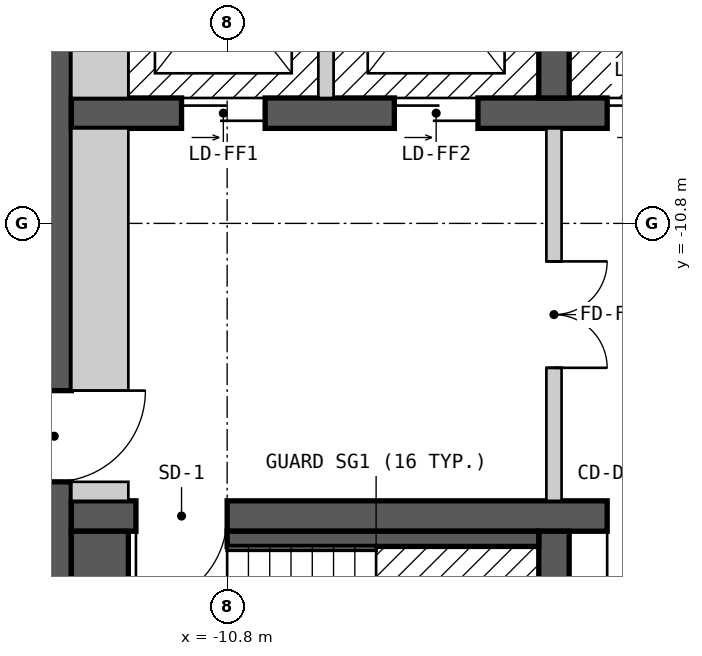
"""IFC4 building model, lengths in metres.
Left out: names, types, materials, properties, quantities, classifications, styles, units other than length and angle.
Written with IfcOpenShell. Run it as: python <this file> out.ifc"""

import sys

from ifc_helpers import new_model, si_unit, direction, frame, frame_2d, origin, place, context, subcontext, project, spatial, rectangle, extrude, element, fill, save


model = new_model("IFC4")
c1 = context("Model", 3, precision=1e-05, world=origin(), true_north=direction((0.0, 1.0)))
c2 = subcontext(c1, "Body", "Model", "MODEL_VIEW")
j1 = project(units=[si_unit("LENGTHUNIT", "METRE"), si_unit("PLANEANGLEUNIT", "RADIAN")], contexts=[c1])
p1 = place(None, origin())
s1 = spatial("IfcSite", under=j1, at=p1, CompositionType="ELEMENT")
p2 = place(p1, origin())
s2 = spatial("IfcBuilding", under=s1, at=p2, CompositionType="ELEMENT")
p3 = place(p2, frame((0.0, 0.0, 205.8)))
s3 = spatial("IfcBuildingStorey", under=s2, at=p3, CompositionType="ELEMENT", Elevation=205.8)
p4 = place(p3, frame((-13.075, -18.55, 0.0), z_axis=(0.0, 0.0, 1.0), x_axis=(0.0, 1.0, 0.0)))
e1 = element("IfcWall", 1, at=p4, inside=s3, PredefinedType="SHEAR", context=c2, shape_type="SweptSolid", body=[
    extrude(rectangle(XDim=13.1, YDim=0.45, at=frame_2d((6.55, 0.0))), origin(), (0.0, 0.0, 1.0), 2.7),
])
p5 = place(p4, frame((4.35, 0.0, 0.0)))
e2 = element("IfcOpeningElement", 2, at=p5, cuts=e1, PredefinedType="OPENING", context=c2, shape_type="SweptSolid", body=[
    extrude(rectangle(XDim=1.2, YDim=2.1, at=frame_2d((0.6, 1.05))), frame((0.0, 0.235, 0.0), z_axis=(0.0, -1.0, 0.0), x_axis=(1.0, 0.0, 0.0)), (0.0, 0.0, 1.0), 0.47),
])
p6 = place(p3, frame((-12.85, -14.65, 0.0), z_axis=(0.0, 0.0, 1.0), x_axis=(1.0, 0.0, 0.0)))
e3 = element("IfcWall", 3, at=p6, inside=s3, PredefinedType="SHEAR", context=c2, shape_type="SweptSolid", body=[
    extrude(rectangle(XDim=25.7, YDim=0.4, at=frame_2d((12.85, 0.0))), origin(), (0.0, 0.0, 1.0), 2.7),
])
p7 = place(p6, frame((2.05, 0.0, 0.0), z_axis=(0.0, 0.0, 1.0), x_axis=(-1.0, 0.0, 0.0)))
e4 = element("IfcOpeningElement", 4, at=p7, cuts=e3, PredefinedType="OPENING", context=c2, shape_type="SweptSolid", body=[
    extrude(rectangle(XDim=1.2, YDim=2.1, at=frame_2d((0.6, 1.05))), frame((0.0, 0.21, 0.0), z_axis=(0.0, -1.0, 0.0), x_axis=(1.0, 0.0, 0.0)), (0.0, 0.0, 1.0), 0.42),
])
p8 = place(p6, frame((24.9, 0.0, 0.0), z_axis=(0.0, 0.0, 1.0), x_axis=(-1.0, 0.0, 0.0)))
e5 = element("IfcOpeningElement", 5, at=p8, cuts=e3, PredefinedType="OPENING", context=c2, shape_type="SweptSolid", body=[
    extrude(rectangle(XDim=1.2, YDim=2.1, at=frame_2d((0.6, 1.05))), frame((0.0, 0.21, 0.0), z_axis=(0.0, -1.0, 0.0), x_axis=(1.0, 0.0, 0.0)), (0.0, 0.0, 1.0), 0.42),
])
p9 = place(p6, frame((7.95, 0.0, 0.0), z_axis=(0.0, 0.0, 1.0), x_axis=(-1.0, 0.0, 0.0)))
e6 = element("IfcOpeningElement", 6, at=p9, cuts=e3, PredefinedType="OPENING", context=c2, shape_type="SweptSolid", body=[
    extrude(rectangle(XDim=0.9, YDim=2.1, at=frame_2d((0.45, 1.05))), frame((0.0, 0.21, 0.0), z_axis=(0.0, -1.0, 0.0), x_axis=(1.0, 0.0, 0.0)), (0.0, 0.0, 1.0), 0.42),
])
p10 = place(p6, frame((10.0, 0.0, 0.0), z_axis=(0.0, 0.0, 1.0), x_axis=(-1.0, 0.0, 0.0)))
e7 = element("IfcOpeningElement", 7, at=p10, cuts=e3, PredefinedType="OPENING", context=c2, shape_type="SweptSolid", body=[
    extrude(rectangle(XDim=0.9, YDim=2.1, at=frame_2d((0.45, 1.05))), frame((0.0, 0.21, 0.0), z_axis=(0.0, -1.0, 0.0), x_axis=(1.0, 0.0, 0.0)), (0.0, 0.0, 1.0), 0.42),
])
p11 = place(p6, frame((12.3, 0.0, 0.0), z_axis=(0.0, 0.0, 1.0), x_axis=(-1.0, 0.0, 0.0)))
e8 = element("IfcOpeningElement", 8, at=p11, cuts=e3, PredefinedType="OPENING", context=c2, shape_type="SweptSolid", body=[
    extrude(rectangle(XDim=1.0, YDim=2.1, at=frame_2d((0.5, 1.05))), frame((0.0, 0.21, 0.0), z_axis=(0.0, -1.0, 0.0), x_axis=(1.0, 0.0, 0.0)), (0.0, 0.0, 1.0), 0.42),
])
p12 = place(p6, frame((14.5, 0.0, 0.0), z_axis=(0.0, 0.0, 1.0), x_axis=(-1.0, 0.0, 0.0)))
e9 = element("IfcOpeningElement", 9, at=p12, cuts=e3, PredefinedType="OPENING", context=c2, shape_type="SweptSolid", body=[
    extrude(rectangle(XDim=0.9, YDim=2.1, at=frame_2d((0.45, 1.05))), frame((0.0, 0.21, 0.0), z_axis=(0.0, -1.0, 0.0), x_axis=(1.0, 0.0, 0.0)), (0.0, 0.0, 1.0), 0.42),
])
p13 = place(p6, frame((16.5, 0.0, 0.0), z_axis=(0.0, 0.0, 1.0), x_axis=(-1.0, 0.0, 0.0)))
e10 = element("IfcOpeningElement", 10, at=p13, cuts=e3, PredefinedType="OPENING", context=c2, shape_type="SweptSolid", body=[
    extrude(rectangle(XDim=0.9, YDim=2.1, at=frame_2d((0.45, 1.05))), frame((0.0, 0.21, 0.0), z_axis=(0.0, -1.0, 0.0), x_axis=(1.0, 0.0, 0.0)), (0.0, 0.0, 1.0), 0.42),
])
p14 = place(p6, frame((18.65, 0.0, 0.0), z_axis=(0.0, 0.0, 1.0), x_axis=(-1.0, 0.0, 0.0)))
e11 = element("IfcOpeningElement", 11, at=p14, cuts=e3, PredefinedType="OPENING", context=c2, shape_type="SweptSolid", body=[
    extrude(rectangle(XDim=1.0, YDim=2.1, at=frame_2d((0.5, 1.05))), frame((0.0, 0.21, 0.0), z_axis=(0.0, -1.0, 0.0), x_axis=(1.0, 0.0, 0.0)), (0.0, 0.0, 1.0), 0.42),
])
p15 = place(p3, frame((-12.85, -9.35, 0.0), z_axis=(0.0, 0.0, 1.0), x_axis=(1.0, 0.0, 0.0)))
e12 = element("IfcWall", 12, at=p15, inside=s3, PredefinedType="SHEAR", context=c2, shape_type="SweptSolid", body=[
    extrude(rectangle(XDim=23.05, YDim=0.4, at=frame_2d((11.525, 0.0))), origin(), (0.0, 0.0, 1.0), 2.7),
])
p16 = place(p15, frame((1.45, 0.0, 0.0)))
e13 = element("IfcOpeningElement", 13, at=p16, cuts=e12, PredefinedType="OPENING", context=c2, shape_type="SweptSolid", body=[
    extrude(rectangle(XDim=1.1, YDim=2.1, at=frame_2d((0.55, 1.05))), frame((0.0, 0.21, 0.0), z_axis=(0.0, -1.0, 0.0), x_axis=(1.0, 0.0, 0.0)), (0.0, 0.0, 1.0), 0.42),
])
p17 = place(p15, frame((4.25, 0.0, 0.0)))
e14 = element("IfcOpeningElement", 14, at=p17, cuts=e12, PredefinedType="OPENING", context=c2, shape_type="SweptSolid", body=[
    extrude(rectangle(XDim=1.1, YDim=2.1, at=frame_2d((0.55, 1.05))), frame((0.0, 0.21, 0.0), z_axis=(0.0, -1.0, 0.0), x_axis=(1.0, 0.0, 0.0)), (0.0, 0.0, 1.0), 0.42),
])
p18 = place(p15, frame((7.05, 0.0, 0.0)))
e15 = element("IfcOpeningElement", 15, at=p18, cuts=e12, PredefinedType="OPENING", context=c2, shape_type="SweptSolid", body=[
    extrude(rectangle(XDim=1.1, YDim=2.1, at=frame_2d((0.55, 1.05))), frame((0.0, 0.21, 0.0), z_axis=(0.0, -1.0, 0.0), x_axis=(1.0, 0.0, 0.0)), (0.0, 0.0, 1.0), 0.42),
])
p19 = place(p15, frame((9.35, 0.0, 0.0)))
e16 = element("IfcOpeningElement", 16, at=p19, cuts=e12, PredefinedType="OPENING", context=c2, shape_type="SweptSolid", body=[
    extrude(rectangle(XDim=1.1, YDim=2.1, at=frame_2d((0.55, 1.05))), frame((0.0, 0.21, 0.0), z_axis=(0.0, -1.0, 0.0), x_axis=(1.0, 0.0, 0.0)), (0.0, 0.0, 1.0), 0.42),
])
p20 = place(p15, frame((11.65, 0.0, 0.0)))
e17 = element("IfcOpeningElement", 17, at=p20, cuts=e12, PredefinedType="OPENING", context=c2, shape_type="SweptSolid", body=[
    extrude(rectangle(XDim=1.1, YDim=2.1, at=frame_2d((0.55, 1.05))), frame((0.0, 0.21, 0.0), z_axis=(0.0, -1.0, 0.0), x_axis=(1.0, 0.0, 0.0)), (0.0, 0.0, 1.0), 0.42),
])
p21 = place(p15, frame((13.95, 0.0, 0.0)))
e18 = element("IfcOpeningElement", 18, at=p21, cuts=e12, PredefinedType="OPENING", context=c2, shape_type="SweptSolid", body=[
    extrude(rectangle(XDim=1.1, YDim=2.1, at=frame_2d((0.55, 1.05))), frame((0.0, 0.21, 0.0), z_axis=(0.0, -1.0, 0.0), x_axis=(1.0, 0.0, 0.0)), (0.0, 0.0, 1.0), 0.42),
])
p22 = place(p15, frame((16.25, 0.0, 0.0)))
e19 = element("IfcOpeningElement", 19, at=p22, cuts=e12, PredefinedType="OPENING", context=c2, shape_type="SweptSolid", body=[
    extrude(rectangle(XDim=1.1, YDim=2.1, at=frame_2d((0.55, 1.05))), frame((0.0, 0.21, 0.0), z_axis=(0.0, -1.0, 0.0), x_axis=(1.0, 0.0, 0.0)), (0.0, 0.0, 1.0), 0.42),
])
p23 = place(p15, frame((18.55, 0.0, 0.0)))
e20 = element("IfcOpeningElement", 20, at=p23, cuts=e12, PredefinedType="OPENING", context=c2, shape_type="SweptSolid", body=[
    extrude(rectangle(XDim=1.1, YDim=2.1, at=frame_2d((0.55, 1.05))), frame((0.0, 0.21, 0.0), z_axis=(0.0, -1.0, 0.0), x_axis=(1.0, 0.0, 0.0)), (0.0, 0.0, 1.0), 0.42),
])
p24 = place(p15, frame((20.95, 0.0, 0.0)))
e21 = element("IfcOpeningElement", 21, at=p24, cuts=e12, PredefinedType="OPENING", context=c2, shape_type="SweptSolid", body=[
    extrude(rectangle(XDim=1.1, YDim=2.1, at=frame_2d((0.55, 1.05))), frame((0.0, 0.21, 0.0), z_axis=(0.0, -1.0, 0.0), x_axis=(1.0, 0.0, 0.0)), (0.0, 0.0, 1.0), 0.42),
])
for number, where, z_axis, x_axis in (
    (22, (-6.5, -18.55, 0.0), (0.0, 0.0, 1.0), (0.0, 1.0, 0.0)),
    (23, (-6.5, -9.15, 0.0), (0.0, 0.0, 1.0), (0.0, 1.0, 0.0)),
):
    element("IfcWall", number, at=place(p3, frame(where, z_axis=z_axis, x_axis=x_axis)), inside=s3, PredefinedType="SHEAR", context=c2, shape_type="SweptSolid", body=[
        extrude(rectangle(XDim=3.7, YDim=0.4, at=frame_2d((1.85, 0.0))), origin(), (0.0, 0.0, 1.0), 2.7),
    ])
p25 = place(p3, frame((-12.475, -18.55, 0.0), z_axis=(0.0, 0.0, 1.0), x_axis=(0.0, 1.0, 0.0)))
e24 = element("IfcWall", 24, at=p25, inside=s3, PredefinedType="SOLIDWALL", context=c2, shape_type="SweptSolid", body=[
    extrude(rectangle(XDim=3.7, YDim=0.75, at=frame_2d((1.85, 0.0))), origin(), (0.0, 0.0, 1.0), 2.7),
])
p26 = place(p3, frame((-12.85, -14.325, 0.0), z_axis=(0.0, 0.0, 1.0), x_axis=(1.0, 0.0, 0.0)))
e25 = element("IfcWall", 25, at=p26, inside=s3, PredefinedType="PARTITIONING", context=c2, shape_type="SweptSolid", body=[
    extrude(rectangle(XDim=0.75, YDim=0.25, at=frame_2d((0.375, 0.0))), origin(), (0.0, 0.0, 1.0), 2.7),
])
p27 = place(p3, frame((-12.475, -13.0, 0.0), z_axis=(0.0, 0.0, 1.0), x_axis=(0.0, 1.0, 0.0)))
e26 = element("IfcWall", 26, at=p27, inside=s3, PredefinedType="PARTITIONING", context=c2, shape_type="SweptSolid", body=[
    extrude(rectangle(XDim=3.45, YDim=0.75, at=frame_2d((1.725, 0.0))), origin(), (0.0, 0.0, 1.0), 2.7),
])
p28 = place(p3, frame((-12.475, -9.15, 0.0), z_axis=(0.0, 0.0, 1.0), x_axis=(0.0, 1.0, 0.0)))
e27 = element("IfcWall", 27, at=p28, inside=s3, PredefinedType="SOLIDWALL", context=c2, shape_type="SweptSolid", body=[
    extrude(rectangle(XDim=3.7, YDim=0.75, at=frame_2d((1.85, 0.0))), origin(), (0.0, 0.0, 1.0), 2.7),
])
p29 = place(p3, frame((-10.8, -14.95, 0.0), z_axis=(0.0, 0.0, 1.0), x_axis=(1.0, 0.0, 0.0)))
e28 = element("IfcWall", 28, at=p29, inside=s3, PredefinedType="SOLIDWALL", context=c2, shape_type="SweptSolid", body=[
    extrude(rectangle(XDim=4.1, YDim=0.2, at=frame_2d((2.05, 0.0))), origin(), (0.0, 0.0, 1.0), 2.7),
])
p30 = place(p3, frame((-9.5, -9.15, 0.0), z_axis=(0.0, 0.0, 1.0), x_axis=(0.0, 1.0, 0.0)))
e29 = element("IfcWall", 29, at=p30, inside=s3, PredefinedType="SOLIDWALL", context=c2, shape_type="SweptSolid", body=[
    extrude(rectangle(XDim=2.95, YDim=0.2, at=frame_2d((1.475, 0.0))), origin(), (0.0, 0.0, 1.0), 2.7),
])
p31 = place(p3, frame((-6.5, -14.45, 0.0), z_axis=(0.0, 0.0, 1.0), x_axis=(0.0, 1.0, 0.0)))
e30 = element("IfcWall", 30, at=p31, inside=s3, PredefinedType="PARTITIONING", context=c2, shape_type="SweptSolid", body=[
    extrude(rectangle(XDim=4.9, YDim=0.2, at=frame_2d((2.45, 0.0))), origin(), (0.0, 0.0, 1.0), 2.7),
])
p32 = place(p31, frame((3.15, 0.0, 0.0), z_axis=(0.0, 0.0, 1.0), x_axis=(-1.0, 0.0, 0.0)))
e31 = element("IfcOpeningElement", 31, at=p32, cuts=e30, PredefinedType="OPENING", context=c2, shape_type="SweptSolid", body=[
    extrude(rectangle(XDim=1.4, YDim=2.1, at=frame_2d((0.7, 1.05))), frame((0.0, 0.11, 0.0), z_axis=(0.0, -1.0, 0.0), x_axis=(1.0, 0.0, 0.0)), (0.0, 0.0, 1.0), 0.22),
])
p33 = place(p16, origin())
e32 = element("IfcDoor", 32, at=p33, inside=s3, OperationType="DOUBLE_DOOR_SLIDING", PredefinedType="DOOR", context=c2, shape_type="SweptSolid", body=[
    extrude(rectangle(XDim=1.1, YDim=2.1, at=frame_2d((0.55, 1.05))), frame((0.0, 0.025, 0.0), z_axis=(0.0, -1.0, 0.0), x_axis=(1.0, 0.0, 0.0)), (0.0, 0.0, 1.0), 0.05),
])
fill(e13, e32)
p34 = place(p17, origin())
e33 = element("IfcDoor", 33, at=p34, inside=s3, OperationType="DOUBLE_DOOR_SLIDING", PredefinedType="DOOR", context=c2, shape_type="SweptSolid", body=[
    extrude(rectangle(XDim=1.1, YDim=2.1, at=frame_2d((0.55, 1.05))), frame((0.0, 0.025, 0.0), z_axis=(0.0, -1.0, 0.0), x_axis=(1.0, 0.0, 0.0)), (0.0, 0.0, 1.0), 0.05),
])
fill(e14, e33)
p35 = place(p18, origin())
e34 = element("IfcDoor", 34, at=p35, inside=s3, OperationType="DOUBLE_DOOR_SLIDING", PredefinedType="DOOR", context=c2, shape_type="SweptSolid", body=[
    extrude(rectangle(XDim=1.1, YDim=2.1, at=frame_2d((0.55, 1.05))), frame((0.0, 0.025, 0.0), z_axis=(0.0, -1.0, 0.0), x_axis=(1.0, 0.0, 0.0)), (0.0, 0.0, 1.0), 0.05),
])
fill(e15, e34)
p36 = place(p7, origin())
e35 = element("IfcDoor", 35, at=p36, inside=s3, OperationType="SINGLE_SWING_RIGHT", PredefinedType="DOOR", context=c2, shape_type="SweptSolid", body=[
    extrude(rectangle(XDim=1.2, YDim=2.1, at=frame_2d((0.6, 1.05))), frame((0.0, 0.025, 0.0), z_axis=(0.0, -1.0, 0.0), x_axis=(1.0, 0.0, 0.0)), (0.0, 0.0, 1.0), 0.05),
])
fill(e4, e35)
p37 = place(p5, origin())
e36 = element("IfcDoor", 36, at=p37, inside=s3, OperationType="SINGLE_SWING_RIGHT", PredefinedType="DOOR", context=c2, shape_type="SweptSolid", body=[
    extrude(rectangle(XDim=1.2, YDim=2.1, at=frame_2d((0.6, 1.05))), frame((0.0, 0.025, 0.0), z_axis=(0.0, -1.0, 0.0), x_axis=(1.0, 0.0, 0.0)), (0.0, 0.0, 1.0), 0.05),
])
fill(e2, e36)
p38 = place(p32, origin())
e37 = element("IfcDoor", 37, at=p38, inside=s3, OperationType="DOUBLE_DOOR_SINGLE_SWING", PredefinedType="DOOR", context=c2, shape_type="SweptSolid", body=[
    extrude(rectangle(XDim=1.4, YDim=2.1, at=frame_2d((0.7, 1.05))), frame((0.0, 0.025, 0.0), z_axis=(0.0, -1.0, 0.0), x_axis=(1.0, 0.0, 0.0)), (0.0, 0.0, 1.0), 0.05),
])
fill(e31, e37)
p39 = place(p9, origin())
e38 = element("IfcDoor", 38, at=p39, inside=s3, OperationType="SINGLE_SWING_RIGHT", PredefinedType="DOOR", context=c2, shape_type="SweptSolid", body=[
    extrude(rectangle(XDim=0.9, YDim=2.1, at=frame_2d((0.45, 1.05))), frame((0.0, 0.025, 0.0), z_axis=(0.0, -1.0, 0.0), x_axis=(1.0, 0.0, 0.0)), (0.0, 0.0, 1.0), 0.05),
])
fill(e6, e38)
save(model, sys.argv[1])
